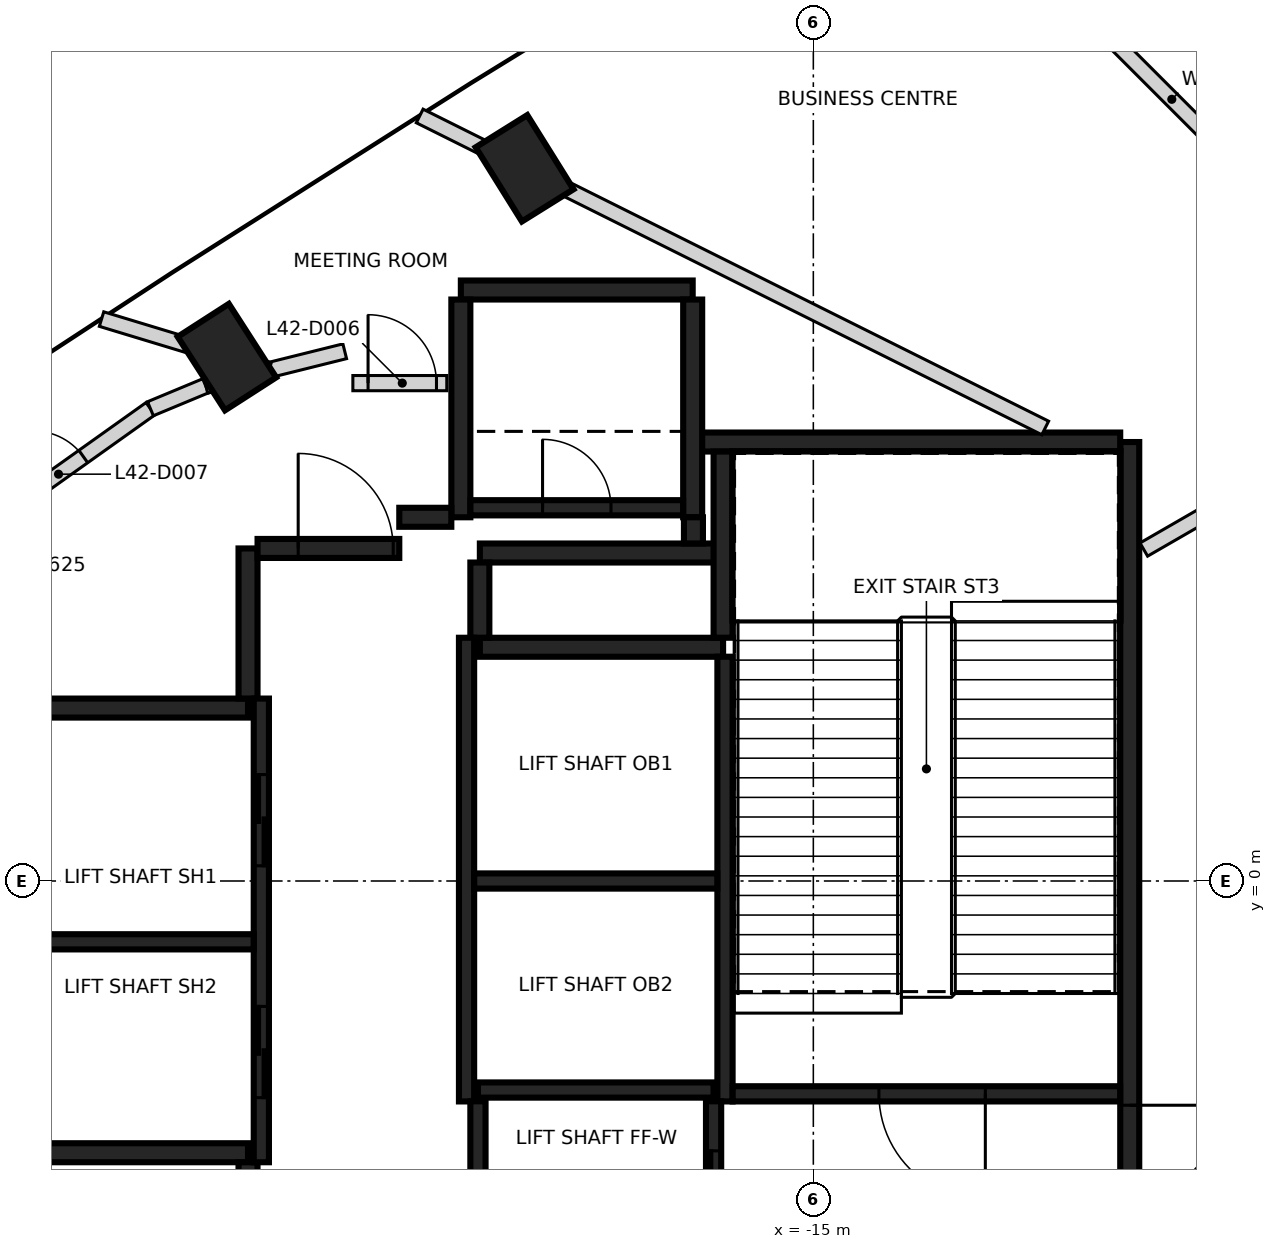
"""IFC4 building model, lengths in metres.
Left out: names, types, materials, properties, quantities, classifications, styles, units other than length and angle.
Written with IfcOpenShell. Run it as: python <this file> out.ifc"""

import sys

from ifc_helpers import new_model, si_unit, direction, frame, frame_2d, origin, origin_2d, place, context, subcontext, project, spatial, rectangle, extrude, element, fill, save


model = new_model("IFC4")
c1 = context("Model", 3, precision=1e-05, world=origin(), true_north=direction((0.0, 1.0)))
c2 = subcontext(c1, "Body", "Model", "MODEL_VIEW")
j1 = project(units=[si_unit("LENGTHUNIT", "METRE"), si_unit("PLANEANGLEUNIT", "RADIAN")], contexts=[c1])
p1 = place(None, origin())
s1 = spatial("IfcSite", under=j1, at=p1, CompositionType="ELEMENT")
p2 = place(p1, origin())
s2 = spatial("IfcBuilding", under=s1, at=p2, CompositionType="ELEMENT")
p3 = place(p2, frame((0.0, 0.0, 169.6)))
s3 = spatial("IfcBuildingStorey", under=s2, at=p3, CompositionType="ELEMENT", Elevation=169.6)
for number, where, z_axis, x_axis in (
    (1, (-18.799, 9.376, -0.35), (0.0, 0.0, 1.0), (-0.529, 0.848, 0.0)),
    (2, (-22.715, 6.892, -0.35), (0.0, 0.0, 1.0), (-0.541, 0.841, 0.0)),
):
    element("IfcColumn", number, at=place(p3, frame(where, z_axis=z_axis, x_axis=x_axis)), inside=s3, PredefinedType="COLUMN", context=c2, shape_type="SweptSolid", body=[
        extrude(rectangle(XDim=1.15, YDim=0.8, at=origin_2d()), origin(), (0.0, 0.0, 1.0), 6.0),
    ])
p4 = place(p3, frame((-10.837, 5.775, 0.0), z_axis=(0.0, 0.0, 1.0), x_axis=(0.0, -1.0, 0.0)))
e3 = element("IfcWall", 3, at=p4, inside=s3, PredefinedType="SHEAR", context=c2, shape_type="SweptSolid", body=[
    extrude(rectangle(XDim=11.55, YDim=0.25, at=frame_2d((5.775, 0.0))), origin(), (0.0, 0.0, 1.0), 5.65),
])
p5 = place(p4, frame((10.025, 0.0, 0.0)))
e4 = element("IfcOpeningElement", 4, at=p5, cuts=e3, PredefinedType="OPENING", context=c2, shape_type="SweptSolid", body=[
    extrude(rectangle(XDim=1.2, YDim=2.1, at=frame_2d((0.6, 1.05))), frame((0.0, 0.135, 0.0), z_axis=(0.0, -1.0, 0.0), x_axis=(1.0, 0.0, 0.0)), (0.0, 0.0, 1.0), 0.27),
])
p6 = place(p4, frame((8.725, 0.0, 0.0)))
e5 = element("IfcOpeningElement", 5, at=p6, cuts=e3, PredefinedType="OPENING", context=c2, shape_type="SweptSolid", body=[
    extrude(rectangle(XDim=1.2, YDim=2.1, at=frame_2d((0.6, 1.05))), frame((0.0, 0.135, 0.0), z_axis=(0.0, -1.0, 0.0), x_axis=(1.0, 0.0, 0.0)), (0.0, 0.0, 1.0), 0.27),
])
p7 = place(p3, frame((-16.472, 5.775, 0.0), z_axis=(0.0, 0.0, 1.0), x_axis=(1.0, 0.0, 0.0)))
e6 = element("IfcWall", 6, at=p7, inside=s3, PredefinedType="SHEAR", context=c2, shape_type="SweptSolid", body=[
    extrude(rectangle(XDim=5.51, YDim=0.25, at=frame_2d((2.755, 0.0))), origin(), (0.0, 0.0, 1.0), 5.65),
])
p8 = place(p3, frame((-19.387, 3.075, 0.0), z_axis=(0.0, 0.0, 1.0), x_axis=(1.0, 0.0, 0.0)))
e7 = element("IfcWall", 7, at=p8, inside=s3, PredefinedType="SHEAR", context=c2, shape_type="SweptSolid", body=[
    extrude(rectangle(XDim=3.2, YDim=0.25, at=frame_2d((1.6, 0.0))), origin(), (0.0, 0.0, 1.0), 5.65),
])
for number, where, z_axis, x_axis in (
    (8, (-22.437, -3.575, 0.0), (0.0, 0.0, 1.0), (-1.0, 0.0, 0.0)),
    (9, (-25.412, 2.275, 0.0), (0.0, 0.0, 1.0), (1.0, 0.0, 0.0)),
):
    element("IfcWall", number, at=place(p3, frame(where, z_axis=z_axis, x_axis=x_axis)), inside=s3, PredefinedType="SHEAR", context=c2, shape_type="SweptSolid", body=[
        extrude(rectangle(XDim=2.975, YDim=0.25, at=frame_2d((1.487, 0.0))), origin(), (0.0, 0.0, 1.0), 5.65),
    ])
p9 = place(p3, frame((-19.637, 7.775, 0.0), z_axis=(0.0, 0.0, 1.0), x_axis=(1.0, 0.0, 0.0)))
e10 = element("IfcWall", 10, at=p9, inside=s3, PredefinedType="SHEAR", context=c2, shape_type="SweptSolid", body=[
    extrude(rectangle(XDim=3.05, YDim=0.25, at=frame_2d((1.525, 0.0))), origin(), (0.0, 0.0, 1.0), 5.65),
])
for number, where, z_axis, x_axis in (
    (11, (-16.587, 7.65, 0.0), (0.0, 0.0, 1.0), (0.0, -1.0, 0.0)),
    (12, (-19.637, 4.785, 0.0), (0.0, 0.0, 1.0), (0.0, 1.0, 0.0)),
):
    element("IfcWall", number, at=place(p3, frame(where, z_axis=z_axis, x_axis=x_axis)), inside=s3, PredefinedType="SHEAR", context=c2, shape_type="SweptSolid", body=[
        extrude(rectangle(XDim=2.865, YDim=0.25, at=frame_2d((1.432, 0.0))), origin(), (0.0, 0.0, 1.0), 5.65),
    ])
p10 = place(p3, frame((-16.302, 4.315, 0.0), z_axis=(0.0, 0.0, 1.0), x_axis=(-1.0, 0.0, 0.0)))
e13 = element("IfcWall", 13, at=p10, inside=s3, PredefinedType="SHEAR", context=c2, shape_type="SweptSolid", body=[
    extrude(rectangle(XDim=3.085, YDim=0.25, at=frame_2d((1.542, 0.0))), origin(), (0.0, 0.0, 1.0), 5.65),
])
p11 = place(p3, frame((-16.187, 3.2, 0.0), z_axis=(0.0, 0.0, 1.0), x_axis=(0.0, 1.0, 0.0)))
e14 = element("IfcWall", 14, at=p11, inside=s3, PredefinedType="SHEAR", context=c2, shape_type="SweptSolid", body=[
    extrude(rectangle(XDim=2.449, YDim=0.25, at=frame_2d((1.225, 0.0))), origin(), (0.0, 0.0, 1.0), 5.65),
])
p12 = place(p3, frame((-22.437, 2.4, 0.0), z_axis=(0.0, 0.0, 1.0), x_axis=(0.0, 1.0, 0.0)))
e15 = element("IfcWall", 15, at=p12, inside=s3, PredefinedType="SHEAR", context=c2, shape_type="SweptSolid", body=[
    extrude(rectangle(XDim=1.975, YDim=0.25, at=frame_2d((0.987, 0.0))), origin(), (0.0, 0.0, 1.0), 5.65),
])
p13 = place(p3, frame((-22.437, -5.55, 0.0), z_axis=(0.0, 0.0, 1.0), x_axis=(0.0, 1.0, 0.0)))
e16 = element("IfcWall", 16, at=p13, inside=s3, PredefinedType="SHEAR", context=c2, shape_type="SweptSolid", body=[
    extrude(rectangle(XDim=1.849, YDim=0.25, at=frame_2d((0.925, 0.0))), origin(), (0.0, 0.0, 1.0), 5.65),
])
p14 = place(p3, frame((-22.312, 4.375, 0.0), z_axis=(0.0, 0.0, 1.0), x_axis=(1.0, 0.0, 0.0)))
e17 = element("IfcWall", 17, at=p14, inside=s3, PredefinedType="SHEAR", context=c2, shape_type="SweptSolid", body=[
    extrude(rectangle(XDim=1.865, YDim=0.25, at=frame_2d((0.932, 0.0))), origin(), (0.0, 0.0, 1.0), 5.65),
])
p15 = place(p14, frame((0.535, 0.0, 0.0)))
e18 = element("IfcOpeningElement", 18, at=p15, cuts=e17, PredefinedType="OPENING", context=c2, shape_type="SweptSolid", body=[
    extrude(rectangle(XDim=1.25, YDim=2.1, at=frame_2d((0.625, 1.05))), frame((0.0, 0.135, 0.0), z_axis=(0.0, -1.0, 0.0), x_axis=(1.0, 0.0, 0.0)), (0.0, 0.0, 1.0), 0.27),
])
p16 = place(p3, frame((-19.387, 4.19, 0.0), z_axis=(0.0, 0.0, 1.0), x_axis=(0.0, -1.0, 0.0)))
e19 = element("IfcWall", 19, at=p16, inside=s3, PredefinedType="SHEAR", context=c2, shape_type="SweptSolid", body=[
    extrude(rectangle(XDim=0.989, YDim=0.25, at=frame_2d((0.495, 0.0))), origin(), (0.0, 0.0, 1.0), 5.65),
])
p17 = place(p3, frame((-20.447, 4.785, 0.0), z_axis=(0.0, 0.0, 1.0), x_axis=(1.0, 0.0, 0.0)))
e20 = element("IfcWall", 20, at=p17, inside=s3, PredefinedType="SHEAR", context=c2, shape_type="SweptSolid", body=[
    extrude(rectangle(XDim=0.685, YDim=0.25, at=frame_2d((0.342, 0.0))), origin(), (0.0, 0.0, 1.0), 5.65),
])
p18 = place(p3, frame((-16.577, 4.785, 0.0), z_axis=(0.0, 0.0, 1.0), x_axis=(0.0, -1.0, 0.0)))
e21 = element("IfcWall", 21, at=p18, inside=s3, PredefinedType="SHEAR", context=c2, shape_type="SweptSolid", body=[
    extrude(rectangle(XDim=0.344, YDim=0.25, at=frame_2d((0.172, 0.0))), origin(), (0.0, 0.0, 1.0), 5.65),
])
p19 = place(p3, frame((-16.162, 2.951, 0.0), z_axis=(0.0, 0.0, 1.0), x_axis=(0.0, -1.0, 0.0)))
e22 = element("IfcWall", 22, at=p19, inside=s3, PredefinedType="SHEAR", context=c2, shape_type="SweptSolid", body=[
    extrude(rectangle(XDim=5.851, YDim=0.2, at=frame_2d((2.925, 0.0))), origin(), (0.0, 0.0, 1.0), 5.65),
])
p20 = place(p3, frame((-19.562, -2.9, 0.0), z_axis=(0.0, 0.0, 1.0), x_axis=(0.0, 1.0, 0.0)))
e23 = element("IfcWall", 23, at=p20, inside=s3, PredefinedType="SHEAR", context=c2, shape_type="SweptSolid", body=[
    extrude(rectangle(XDim=6.1, YDim=0.2, at=frame_2d((3.05, 0.0))), origin(), (0.0, 0.0, 1.0), 5.65),
])
p21 = place(p3, frame((-22.262, 2.4, 0.0), z_axis=(0.0, 0.0, 1.0), x_axis=(0.0, -1.0, 0.0)))
e24 = element("IfcWall", 24, at=p21, inside=s3, PredefinedType="SHEAR", context=c2, shape_type="SweptSolid", body=[
    extrude(rectangle(XDim=6.1, YDim=0.2, at=frame_2d((3.05, 0.0))), origin(), (0.0, 0.0, 1.0), 5.65),
])
p22 = place(p21, frame((1.0, 0.0, 0.0)))
e25 = element("IfcOpeningElement", 25, at=p22, cuts=e24, PredefinedType="OPENING", context=c2, shape_type="SweptSolid", body=[
    extrude(rectangle(XDim=1.2, YDim=2.1, at=frame_2d((0.6, 1.05))), frame((0.0, 0.11, 0.0), z_axis=(0.0, -1.0, 0.0), x_axis=(1.0, 0.0, 0.0)), (0.0, 0.0, 1.0), 0.22),
])
p23 = place(p21, frame((4.05, 0.0, 0.0)))
e26 = element("IfcOpeningElement", 26, at=p23, cuts=e24, PredefinedType="OPENING", context=c2, shape_type="SweptSolid", body=[
    extrude(rectangle(XDim=1.2, YDim=2.1, at=frame_2d((0.6, 1.05))), frame((0.0, 0.11, 0.0), z_axis=(0.0, -1.0, 0.0), x_axis=(1.0, 0.0, 0.0)), (0.0, 0.0, 1.0), 0.22),
])
p24 = place(p3, frame((-10.963, -2.8, 0.0), z_axis=(0.0, 0.0, 1.0), x_axis=(-1.0, 0.0, 0.0)))
e27 = element("IfcWall", 27, at=p24, inside=s3, PredefinedType="SHEAR", context=c2, shape_type="SweptSolid", body=[
    extrude(rectangle(XDim=5.098, YDim=0.2, at=frame_2d((2.549, 0.0))), origin(), (0.0, 0.0, 1.0), 5.65),
])
p25 = place(p24, frame((1.774, 0.0, 0.0)))
e28 = element("IfcOpeningElement", 28, at=p25, cuts=e27, PredefinedType="OPENING", context=c2, shape_type="SweptSolid", body=[
    extrude(rectangle(XDim=1.4, YDim=2.1, at=frame_2d((0.7, 1.05))), frame((0.0, 0.11, 0.0), z_axis=(0.0, -1.0, 0.0), x_axis=(1.0, 0.0, 0.0)), (0.0, 0.0, 1.0), 0.22),
])
p26 = place(p3, frame((-16.263, 0.0, 0.0), z_axis=(0.0, 0.0, 1.0), x_axis=(-1.0, 0.0, 0.0)))
e29 = element("IfcWall", 29, at=p26, inside=s3, PredefinedType="SHEAR", context=c2, shape_type="SweptSolid", body=[
    extrude(rectangle(XDim=3.198, YDim=0.2, at=frame_2d((1.599, 0.0))), origin(), (0.0, 0.0, 1.0), 5.65),
])
p27 = place(p3, frame((-22.363, -0.8, 0.0), z_axis=(0.0, 0.0, 1.0), x_axis=(-1.0, 0.0, 0.0)))
e30 = element("IfcWall", 30, at=p27, inside=s3, PredefinedType="SHEAR", context=c2, shape_type="SweptSolid", body=[
    extrude(rectangle(XDim=3.048, YDim=0.2, at=frame_2d((1.524, 0.0))), origin(), (0.0, 0.0, 1.0), 5.65),
])
p28 = place(p3, frame((-19.511, 4.91, 0.0), z_axis=(0.0, 0.0, 1.0), x_axis=(1.0, 0.0, 0.0)))
e31 = element("IfcWall", 31, at=p28, inside=s3, PredefinedType="SHEAR", context=c2, shape_type="SweptSolid", body=[
    extrude(rectangle(XDim=2.798, YDim=0.2, at=frame_2d((1.399, 0.0))), origin(), (0.0, 0.0, 1.0), 5.65),
])
p29 = place(p28, frame((0.949, 0.0, 0.0)))
e32 = element("IfcOpeningElement", 32, at=p29, cuts=e31, PredefinedType="OPENING", context=c2, shape_type="SweptSolid", body=[
    extrude(rectangle(XDim=0.9, YDim=2.1, at=frame_2d((0.45, 1.05))), frame((0.0, 0.11, 0.0), z_axis=(0.0, -1.0, 0.0), x_axis=(1.0, 0.0, 0.0)), (0.0, 0.0, 1.0), 0.22),
])
p30 = place(p3, frame((-19.412, -2.75, 0.0), z_axis=(0.0, 0.0, 1.0), x_axis=(1.0, 0.0, 0.0)))
e33 = element("IfcWall", 33, at=p30, inside=s3, PredefinedType="SHEAR", context=c2, shape_type="SweptSolid", body=[
    extrude(rectangle(XDim=3.1, YDim=0.2, at=frame_2d((1.55, 0.0))), origin(), (0.0, 0.0, 1.0), 5.65),
])
p31 = place(p3, frame((-16.312, -2.898, 0.0), z_axis=(0.0, 0.0, 1.0), x_axis=(0.0, -1.0, 0.0)))
e34 = element("IfcWall", 34, at=p31, inside=s3, PredefinedType="SHEAR", context=c2, shape_type="SweptSolid", body=[
    extrude(rectangle(XDim=2.651, YDim=0.2, at=frame_2d((1.325, 0.0))), origin(), (0.0, 0.0, 1.0), 5.65),
])
p32 = place(p31, frame((0.652, 0.0, 0.0)))
e35 = element("IfcOpeningElement", 35, at=p32, cuts=e34, PredefinedType="OPENING", context=c2, shape_type="SweptSolid", body=[
    extrude(rectangle(XDim=1.3, YDim=2.1, at=frame_2d((0.65, 1.05))), frame((0.0, 0.11, 0.0), z_axis=(0.0, -1.0, 0.0), x_axis=(1.0, 0.0, 0.0)), (0.0, 0.0, 1.0), 0.22),
])
p33 = place(p3, frame((-19.412, -5.549, 0.0), z_axis=(0.0, 0.0, 1.0), x_axis=(0.0, 1.0, 0.0)))
e36 = element("IfcWall", 36, at=p33, inside=s3, PredefinedType="SHEAR", context=c2, shape_type="SweptSolid", body=[
    extrude(rectangle(XDim=2.651, YDim=0.2, at=frame_2d((1.325, 0.0))), origin(), (0.0, 0.0, 1.0), 5.65),
])
p34 = place(p3, frame((-26.5, 4.235, 0.0), z_axis=(0.0, 0.0, 1.0), x_axis=(0.814738171434, 0.579829036879, 0.0)))
e37 = element("IfcWall", 37, at=p34, inside=s3, PredefinedType="PARTITIONING", context=c2, shape_type="SweptSolid", body=[
    extrude(rectangle(XDim=3.411, YDim=0.2, at=frame_2d((1.706, 0.0))), origin(), (0.0, 0.0, 1.0), 4.75),
])
p35 = place(p34, frame((1.527, 0.0, 0.0)))
e38 = element("IfcOpeningElement", 38, at=p35, cuts=e37, PredefinedType="OPENING", context=c2, shape_type="SweptSolid", body=[
    extrude(rectangle(XDim=0.8, YDim=2.1, at=frame_2d((0.4, 1.05))), frame((0.0, 0.11, 0.0), z_axis=(0.0, -1.0, 0.0), x_axis=(1.0, 0.0, 0.0)), (0.0, 0.0, 1.0), 0.22),
])
p36 = place(p3, frame((-23.721, 6.213, 0.0), z_axis=(0.0, 0.0, 1.0), x_axis=(0.923269753153, 0.384152265271, 0.0)))
e39 = element("IfcWall", 39, at=p36, inside=s3, PredefinedType="PARTITIONING", context=c2, shape_type="SweptSolid", body=[
    extrude(rectangle(XDim=0.786, YDim=0.2, at=frame_2d((0.393, 0.0))), origin(), (0.0, 0.0, 1.0), 4.75),
])
p37 = place(p3, frame((-22.992, 6.515, 0.0), z_axis=(0.0, 0.0, 1.0), x_axis=(0.97043928485, 0.241345384085, 0.0)))
e40 = element("IfcWall", 40, at=p37, inside=s3, PredefinedType="PARTITIONING", context=c2, shape_type="SweptSolid", body=[
    extrude(rectangle(XDim=1.883, YDim=0.2, at=frame_2d((0.941, 0.0))), origin(), (0.0, 0.0, 1.0), 5.65),
])
p38 = place(p3, frame((-21.058, 6.55, 0.0), z_axis=(0.0, 0.0, 1.0), x_axis=(1.0, 0.0, 0.0)))
e41 = element("IfcWall", 41, at=p38, inside=s3, PredefinedType="PARTITIONING", context=c2, shape_type="SweptSolid", body=[
    extrude(rectangle(XDim=1.236, YDim=0.2, at=frame_2d((0.618, 0.0))), origin(), (0.0, 0.0, 1.0), 5.65),
])
p39 = place(p38, frame((0.2, 0.0, 0.0)))
e42 = element("IfcOpeningElement", 42, at=p39, cuts=e41, PredefinedType="OPENING", context=c2, shape_type="SweptSolid", body=[
    extrude(rectangle(XDim=0.9, YDim=2.1, at=frame_2d((0.45, 1.05))), frame((0.0, 0.11, 0.0), z_axis=(0.0, -1.0, 0.0), x_axis=(1.0, 0.0, 0.0)), (0.0, 0.0, 1.0), 0.22),
])
p40 = place(p3, frame((-10.652, 4.36, 0.0), z_axis=(0.0, 0.0, 1.0), x_axis=(0.866215711467, 0.499670232461, 0.0)))
e43 = element("IfcWall", 43, at=p40, inside=s3, PredefinedType="PARTITIONING", context=c2, shape_type="SweptSolid", body=[
    extrude(rectangle(XDim=11.468, YDim=0.2, at=frame_2d((5.734, 0.0))), origin(), (0.0, 0.0, 1.0), 5.65),
])
p41 = place(p40, frame((5.484, 0.0, 0.0)))
e44 = element("IfcOpeningElement", 44, at=p41, cuts=e43, PredefinedType="OPENING", context=c2, shape_type="SweptSolid", body=[
    extrude(rectangle(XDim=1.0, YDim=2.1, at=frame_2d((0.5, 1.05))), frame((0.0, 0.11, 0.0), z_axis=(0.0, -1.0, 0.0), x_axis=(1.0, 0.0, 0.0)), (0.0, 0.0, 1.0), 0.22),
])
p42 = place(p40, frame((1.775, 0.0, 0.0)))
e45 = element("IfcOpeningElement", 45, at=p42, cuts=e43, PredefinedType="OPENING", context=c2, shape_type="SweptSolid", body=[
    extrude(rectangle(XDim=1.0, YDim=2.1, at=frame_2d((0.5, 1.05))), frame((0.0, 0.11, 0.0), z_axis=(0.0, -1.0, 0.0), x_axis=(1.0, 0.0, 0.0)), (0.0, 0.0, 1.0), 0.22),
])
p43 = place(p3, frame((-24.364, 7.393, 0.0), z_axis=(0.0, 0.0, 1.0), x_axis=(0.956967335925, -0.290195654642, 0.0)))
e46 = element("IfcWall", 46, at=p43, inside=s3, PredefinedType="PARTITIONING", context=c2, shape_type="SweptSolid", body=[
    extrude(rectangle(XDim=2.303, YDim=0.2, at=frame_2d((1.152, 0.0))), origin(), (0.0, 0.0, 1.0), 5.65),
])
p44 = place(p3, frame((-20.179, 10.065, 0.0), z_axis=(0.0, 0.0, 1.0), x_axis=(0.894867434309, -0.446332023289, 0.0)))
e47 = element("IfcWall", 47, at=p44, inside=s3, PredefinedType="PARTITIONING", context=c2, shape_type="SweptSolid", body=[
    extrude(rectangle(XDim=9.197, YDim=0.2, at=frame_2d((4.598, 0.0))), origin(), (0.0, 0.0, 1.0), 5.65),
])
p45 = place(p3, frame((-13.905, 13.905, 0.0), z_axis=(0.0, 0.0, 1.0), x_axis=(0.707106781187, -0.707106781187, 0.0)))
e48 = element("IfcWall", 48, at=p45, inside=s3, PredefinedType="PARTITIONING", context=c2, shape_type="SweptSolid", body=[
    extrude(rectangle(XDim=10.241, YDim=0.2, at=frame_2d((5.121, 0.0))), origin(), (0.0, 0.0, 1.0), 4.75),
])
p46 = place(p32, origin())
e49 = element("IfcDoor", 49, at=p46, inside=s3, OperationType="SLIDING_TO_LEFT", PredefinedType="DOOR", context=c2, shape_type="SweptSolid", body=[
    extrude(rectangle(XDim=1.3, YDim=2.1, at=frame_2d((0.65, 1.05))), frame((0.0, 0.025, 0.0), z_axis=(0.0, -1.0, 0.0), x_axis=(1.0, 0.0, 0.0)), (0.0, 0.0, 1.0), 0.05),
])
fill(e35, e49)
p47 = place(p22, origin())
e50 = element("IfcDoor", 50, at=p47, inside=s3, OperationType="DOUBLE_DOOR_SLIDING", PredefinedType="DOOR", context=c2, shape_type="SweptSolid", body=[
    extrude(rectangle(XDim=1.2, YDim=2.1, at=frame_2d((0.6, 1.05))), frame((0.0, 0.025, 0.0), z_axis=(0.0, -1.0, 0.0), x_axis=(1.0, 0.0, 0.0)), (0.0, 0.0, 1.0), 0.05),
])
fill(e25, e50)
p48 = place(p23, origin())
e51 = element("IfcDoor", 51, at=p48, inside=s3, OperationType="DOUBLE_DOOR_SLIDING", PredefinedType="DOOR", context=c2, shape_type="SweptSolid", body=[
    extrude(rectangle(XDim=1.2, YDim=2.1, at=frame_2d((0.6, 1.05))), frame((0.0, 0.025, 0.0), z_axis=(0.0, -1.0, 0.0), x_axis=(1.0, 0.0, 0.0)), (0.0, 0.0, 1.0), 0.05),
])
fill(e26, e51)
p49 = place(p15, origin())
e52 = element("IfcDoor", 52, at=p49, inside=s3, OperationType="SINGLE_SWING_LEFT", PredefinedType="DOOR", context=c2, shape_type="SweptSolid", body=[
    extrude(rectangle(XDim=1.25, YDim=2.1, at=frame_2d((0.625, 1.05))), frame((0.0, 0.025, 0.0), z_axis=(0.0, -1.0, 0.0), x_axis=(1.0, 0.0, 0.0)), (0.0, 0.0, 1.0), 0.05),
])
fill(e18, e52)
p50 = place(p6, origin())
e53 = element("IfcDoor", 53, at=p50, inside=s3, OperationType="SINGLE_SWING_RIGHT", PredefinedType="DOOR", context=c2, shape_type="SweptSolid", body=[
    extrude(rectangle(XDim=1.2, YDim=2.1, at=frame_2d((0.6, 1.05))), frame((0.0, 0.025, 0.0), z_axis=(0.0, -1.0, 0.0), x_axis=(1.0, 0.0, 0.0)), (0.0, 0.0, 1.0), 0.05),
])
fill(e5, e53)
p51 = place(p25, origin())
e54 = element("IfcDoor", 54, at=p51, inside=s3, OperationType="SINGLE_SWING_LEFT", PredefinedType="DOOR", context=c2, shape_type="SweptSolid", body=[
    extrude(rectangle(XDim=1.4, YDim=2.1, at=frame_2d((0.7, 1.05))), frame((0.0, 0.025, 0.0), z_axis=(0.0, -1.0, 0.0), x_axis=(1.0, 0.0, 0.0)), (0.0, 0.0, 1.0), 0.05),
])
fill(e28, e54)
p52 = place(p29, origin())
e55 = element("IfcDoor", 55, at=p52, inside=s3, OperationType="SINGLE_SWING_RIGHT", PredefinedType="DOOR", context=c2, shape_type="SweptSolid", body=[
    extrude(rectangle(XDim=0.9, YDim=2.1, at=frame_2d((0.45, 1.05))), frame((0.0, 0.025, 0.0), z_axis=(0.0, -1.0, 0.0), x_axis=(1.0, 0.0, 0.0)), (0.0, 0.0, 1.0), 0.05),
])
fill(e32, e55)
p53 = place(p39, origin())
e56 = element("IfcDoor", 56, at=p53, inside=s3, OperationType="SINGLE_SWING_LEFT", PredefinedType="DOOR", context=c2, shape_type="SweptSolid", body=[
    extrude(rectangle(XDim=0.9, YDim=2.1, at=frame_2d((0.45, 1.05))), frame((0.0, 0.025, 0.0), z_axis=(0.0, -1.0, 0.0), x_axis=(1.0, 0.0, 0.0)), (0.0, 0.0, 1.0), 0.05),
])
fill(e42, e56)
p54 = place(p35, origin())
e57 = element("IfcDoor", 57, at=p54, inside=s3, OperationType="SINGLE_SWING_LEFT", PredefinedType="DOOR", context=c2, shape_type="SweptSolid", body=[
    extrude(rectangle(XDim=0.8, YDim=2.1, at=frame_2d((0.4, 1.05))), frame((0.0, 0.025, 0.0), z_axis=(0.0, -1.0, 0.0), x_axis=(1.0, 0.0, 0.0)), (0.0, 0.0, 1.0), 0.05),
])
fill(e38, e57)
save(model, sys.argv[1])
